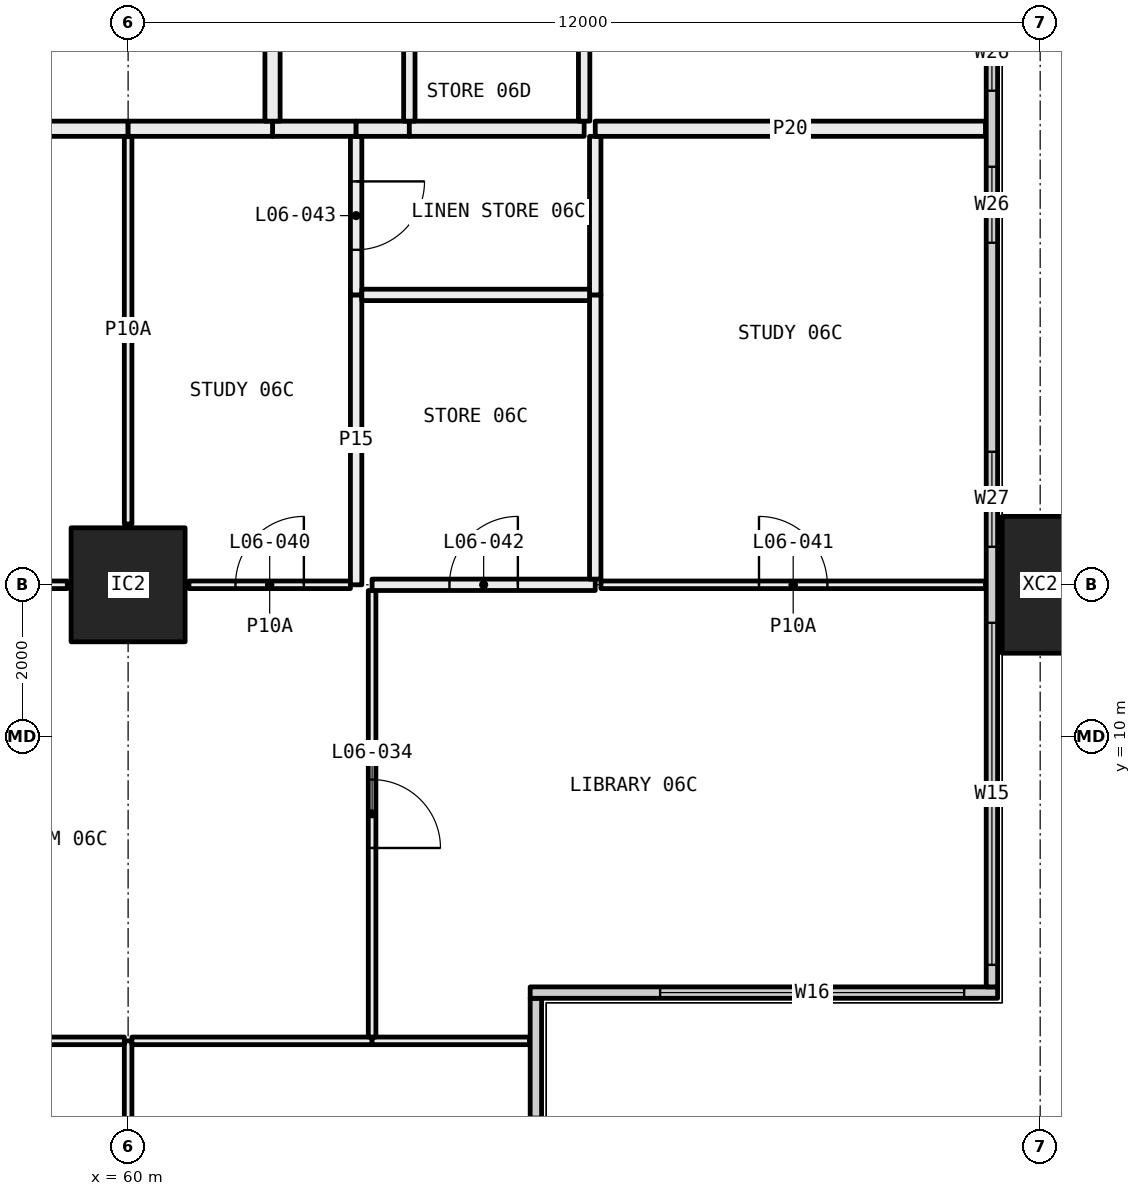
"""IFC4 building model, lengths in metres.
Left out: names, types, materials, properties, quantities, classifications, styles, units other than length and angle.
Written with IfcOpenShell. Run it as: python <this file> out.ifc"""

import sys

from ifc_helpers import new_model, si_unit, direction, frame, frame_2d, origin, origin_2d, place, context, subcontext, project, spatial, rectangle, hollow_rectangle, extrude, element, fill, save


model = new_model("IFC4")
c1 = context("Model", 3, precision=1e-05, world=origin(), true_north=direction((0.0, 1.0)))
c2 = subcontext(c1, "Body", "Model", "MODEL_VIEW")
j1 = project(units=[si_unit("LENGTHUNIT", "METRE"), si_unit("PLANEANGLEUNIT", "RADIAN")], contexts=[c1])
p1 = place(None, origin())
s1 = spatial("IfcSite", under=j1, at=p1, CompositionType="ELEMENT")
p2 = place(p1, origin())
s2 = spatial("IfcBuilding", under=s1, at=p2, CompositionType="ELEMENT")
p3 = place(p2, frame((0.0, 0.0, 33.45)))
s3 = spatial("IfcBuildingStorey", under=s2, at=p3, CompositionType="ELEMENT", Elevation=33.45)
p4 = place(p3, frame((60.0, 12.0, 0.0), z_axis=(0.0, 0.0, 1.0), x_axis=(1.0, 0.0, 0.0)))
e1 = element("IfcColumn", 1, at=p4, inside=s3, PredefinedType="COLUMN", context=c2, shape_type="SweptSolid", body=[
    extrude(hollow_rectangle(XDim=1.5, YDim=1.5, WallThickness=0.065, at=origin_2d()), origin(), (0.0, 0.0, 1.0), 3.05),
])
p5 = place(p3, frame((72.0, 12.0, -0.4), z_axis=(0.0, 0.0, 1.0), x_axis=(0.0, 1.0, 0.0)))
e2 = element("IfcColumn", 2, at=p5, inside=s3, PredefinedType="COLUMN", context=c2, shape_type="SweptSolid", body=[
    extrude(hollow_rectangle(XDim=1.8, YDim=1.0, WallThickness=0.07, at=origin_2d()), origin(), (0.0, 0.0, 1.0), 3.45),
])
p6 = place(p3, frame((65.365, 0.71, 0.0), z_axis=(0.0, 0.0, 1.0), x_axis=(0.0, 1.0, 0.0)))
e3 = element("IfcWall", 3, at=p6, inside=s3, PredefinedType="ELEMENTEDWALL", context=c2, shape_type="SweptSolid", body=[
    extrude(rectangle(XDim=5.85, YDim=0.15, at=frame_2d((2.925, 0.0))), origin(), (0.0, 0.0, 1.0), 3.05),
])
p7 = place(p6, frame((0.29, 0.0, 0.45)))
e4 = element("IfcOpeningElement", 4, at=p7, cuts=e3, PredefinedType="OPENING", context=c2, shape_type="SweptSolid", body=[
    extrude(rectangle(XDim=4.0, YDim=2.55, at=frame_2d((2.0, 1.275))), frame((0.0, 0.085, 0.0), z_axis=(0.0, -1.0, 0.0), x_axis=(1.0, 0.0, 0.0)), (0.0, 0.0, 1.0), 0.17),
])
p8 = place(p3, frame((65.29, 6.635, 0.0), z_axis=(0.0, 0.0, 1.0), x_axis=(1.0, 0.0, 0.0)))
e5 = element("IfcWall", 5, at=p8, inside=s3, PredefinedType="ELEMENTEDWALL", context=c2, shape_type="SweptSolid", body=[
    extrude(rectangle(XDim=6.15, YDim=0.15, at=frame_2d((3.075, 0.0))), origin(), (0.0, 0.0, 1.0), 3.05),
])
p9 = place(p8, frame((1.71, 0.0, 0.45)))
e6 = element("IfcOpeningElement", 6, at=p9, cuts=e5, PredefinedType="OPENING", context=c2, shape_type="SweptSolid", body=[
    extrude(rectangle(XDim=4.0, YDim=2.55, at=frame_2d((2.0, 1.275))), frame((0.0, 0.085, 0.0), z_axis=(0.0, -1.0, 0.0), x_axis=(1.0, 0.0, 0.0)), (0.0, 0.0, 1.0), 0.17),
])
p10 = place(p3, frame((71.365, 6.71, 0.0), z_axis=(0.0, 0.0, 1.0), x_axis=(0.0, 1.0, 0.0)))
e7 = element("IfcWall", 7, at=p10, inside=s3, PredefinedType="ELEMENTEDWALL", context=c2, shape_type="SweptSolid", body=[
    extrude(rectangle(XDim=34.58, YDim=0.15, at=frame_2d((17.29, 0.0))), origin(), (0.0, 0.0, 1.0), 3.05),
])
p11 = place(p10, frame((0.29, 0.0, 0.45)))
e8 = element("IfcOpeningElement", 8, at=p11, cuts=e7, PredefinedType="OPENING", context=c2, shape_type="SweptSolid", body=[
    extrude(rectangle(XDim=4.5, YDim=2.55, at=frame_2d((2.25, 1.275))), frame((0.0, 0.085, 0.0), z_axis=(0.0, -1.0, 0.0), x_axis=(1.0, 0.0, 0.0)), (0.0, 0.0, 1.0), 0.17),
])
p12 = place(p10, frame((5.79, 0.0, 0.45)))
e9 = element("IfcOpeningElement", 9, at=p12, cuts=e7, PredefinedType="OPENING", context=c2, shape_type="SweptSolid", body=[
    extrude(rectangle(XDim=1.25, YDim=2.55, at=frame_2d((0.625, 1.275))), frame((0.0, 0.085, 0.0), z_axis=(0.0, -1.0, 0.0), x_axis=(1.0, 0.0, 0.0)), (0.0, 0.0, 1.0), 0.17),
])
p13 = place(p10, frame((9.79, 0.0, 0.45)))
e10 = element("IfcOpeningElement", 10, at=p13, cuts=e7, PredefinedType="OPENING", context=c2, shape_type="SweptSolid", body=[
    extrude(rectangle(XDim=1.0, YDim=2.55, at=frame_2d((0.5, 1.275))), frame((0.0, 0.085, 0.0), z_axis=(0.0, -1.0, 0.0), x_axis=(1.0, 0.0, 0.0)), (0.0, 0.0, 1.0), 0.17),
])
p14 = place(p10, frame((11.79, 0.0, 0.45)))
e11 = element("IfcOpeningElement", 11, at=p14, cuts=e7, PredefinedType="OPENING", context=c2, shape_type="SweptSolid", body=[
    extrude(rectangle(XDim=1.0, YDim=2.55, at=frame_2d((0.5, 1.275))), frame((0.0, 0.085, 0.0), z_axis=(0.0, -1.0, 0.0), x_axis=(1.0, 0.0, 0.0)), (0.0, 0.0, 1.0), 0.17),
])
p15 = place(p10, frame((15.54, 0.0, 0.45)))
e12 = element("IfcOpeningElement", 12, at=p15, cuts=e7, PredefinedType="OPENING", context=c2, shape_type="SweptSolid", body=[
    extrude(rectangle(XDim=1.25, YDim=2.55, at=frame_2d((0.625, 1.275))), frame((0.0, 0.085, 0.0), z_axis=(0.0, -1.0, 0.0), x_axis=(1.0, 0.0, 0.0)), (0.0, 0.0, 1.0), 0.17),
])
p16 = place(p10, frame((17.79, 0.0, 0.45)))
e13 = element("IfcOpeningElement", 13, at=p16, cuts=e7, PredefinedType="OPENING", context=c2, shape_type="SweptSolid", body=[
    extrude(rectangle(XDim=1.25, YDim=2.55, at=frame_2d((0.625, 1.275))), frame((0.0, 0.085, 0.0), z_axis=(0.0, -1.0, 0.0), x_axis=(1.0, 0.0, 0.0)), (0.0, 0.0, 1.0), 0.17),
])
p17 = place(p10, frame((21.79, 0.0, 0.45)))
e14 = element("IfcOpeningElement", 14, at=p17, cuts=e7, PredefinedType="OPENING", context=c2, shape_type="SweptSolid", body=[
    extrude(rectangle(XDim=1.0, YDim=2.55, at=frame_2d((0.5, 1.275))), frame((0.0, 0.085, 0.0), z_axis=(0.0, -1.0, 0.0), x_axis=(1.0, 0.0, 0.0)), (0.0, 0.0, 1.0), 0.17),
])
p18 = place(p10, frame((23.79, 0.0, 0.45)))
e15 = element("IfcOpeningElement", 15, at=p18, cuts=e7, PredefinedType="OPENING", context=c2, shape_type="SweptSolid", body=[
    extrude(rectangle(XDim=1.0, YDim=2.55, at=frame_2d((0.5, 1.275))), frame((0.0, 0.085, 0.0), z_axis=(0.0, -1.0, 0.0), x_axis=(1.0, 0.0, 0.0)), (0.0, 0.0, 1.0), 0.17),
])
p19 = place(p10, frame((27.54, 0.0, 0.45)))
e16 = element("IfcOpeningElement", 16, at=p19, cuts=e7, PredefinedType="OPENING", context=c2, shape_type="SweptSolid", body=[
    extrude(rectangle(XDim=1.25, YDim=2.55, at=frame_2d((0.625, 1.275))), frame((0.0, 0.085, 0.0), z_axis=(0.0, -1.0, 0.0), x_axis=(1.0, 0.0, 0.0)), (0.0, 0.0, 1.0), 0.17),
])
p20 = place(p10, frame((29.79, 0.0, 0.45)))
e17 = element("IfcOpeningElement", 17, at=p20, cuts=e7, PredefinedType="OPENING", context=c2, shape_type="SweptSolid", body=[
    extrude(rectangle(XDim=4.5, YDim=2.55, at=frame_2d((2.25, 1.275))), frame((0.0, 0.085, 0.0), z_axis=(0.0, -1.0, 0.0), x_axis=(1.0, 0.0, 0.0)), (0.0, 0.0, 1.0), 0.17),
])
p21 = place(p3, frame((60.0, 0.72, 0.0), z_axis=(0.0, 0.0, 1.0), x_axis=(0.0, 1.0, 0.0)))
e18 = element("IfcWall", 18, at=p21, inside=s3, PredefinedType="PARTITIONING", context=c2, shape_type="SweptSolid", body=[
    extrude(rectangle(XDim=5.28, YDim=0.1, at=frame_2d((2.64, 0.0))), origin(), (0.0, 0.0, 1.0), 2.45),
])
p22 = place(p21, frame((2.19, 0.0, 0.0)))
e19 = element("IfcOpeningElement", 19, at=p22, cuts=e18, PredefinedType="OPENING", context=c2, shape_type="SweptSolid", body=[
    extrude(rectangle(XDim=0.9, YDim=2.1, at=frame_2d((0.45, 1.05))), frame((0.0, 0.06, 0.0), z_axis=(0.0, -1.0, 0.0), x_axis=(1.0, 0.0, 0.0)), (0.0, 0.0, 1.0), 0.12),
])
p23 = place(p3, frame((59.95, 6.0, 0.0), z_axis=(0.0, 0.0, 1.0), x_axis=(-1.0, 0.0, 0.0)))
e20 = element("IfcWall", 20, at=p23, inside=s3, PredefinedType="PARTITIONING", context=c2, shape_type="SweptSolid", body=[
    extrude(rectangle(XDim=4.81, YDim=0.1, at=frame_2d((2.405, 0.0))), origin(), (0.0, 0.0, 1.0), 2.45),
])
p24 = place(p3, frame((63.21, 6.0, 0.0), z_axis=(0.0, 0.0, 1.0), x_axis=(-1.0, 0.0, 0.0)))
e21 = element("IfcWall", 21, at=p24, inside=s3, PredefinedType="PARTITIONING", context=c2, shape_type="SweptSolid", body=[
    extrude(rectangle(XDim=3.16, YDim=0.1, at=frame_2d((1.58, 0.0))), origin(), (0.0, 0.0, 1.0), 2.45),
])
p25 = place(p3, frame((65.28, 6.0, 0.0), z_axis=(0.0, 0.0, 1.0), x_axis=(-1.0, 0.0, 0.0)))
e22 = element("IfcWall", 22, at=p25, inside=s3, PredefinedType="PARTITIONING", context=c2, shape_type="SweptSolid", body=[
    extrude(rectangle(XDim=2.07, YDim=0.1, at=frame_2d((1.035, 0.0))), origin(), (0.0, 0.0, 1.0), 3.05),
])
p26 = place(p3, frame((63.21, 6.05, 0.0), z_axis=(0.0, 0.0, 1.0), x_axis=(0.0, 1.0, 0.0)))
e23 = element("IfcWall", 23, at=p26, inside=s3, PredefinedType="PARTITIONING", context=c2, shape_type="SweptSolid", body=[
    extrude(rectangle(XDim=5.875, YDim=0.1, at=frame_2d((2.938, 0.0))), origin(), (0.0, 0.0, 1.0), 2.45),
])
p27 = place(p26, frame((2.488, 0.0, 0.0)))
e24 = element("IfcOpeningElement", 24, at=p27, cuts=e23, PredefinedType="OPENING", context=c2, shape_type="SweptSolid", body=[
    extrude(rectangle(XDim=0.9, YDim=2.1, at=frame_2d((0.45, 1.05))), frame((0.0, 0.06, 0.0), z_axis=(0.0, -1.0, 0.0), x_axis=(1.0, 0.0, 0.0)), (0.0, 0.0, 1.0), 0.12),
])
p28 = place(p3, frame((59.2, 12.0, 0.0), z_axis=(0.0, 0.0, 1.0), x_axis=(-1.0, 0.0, 0.0)))
e25 = element("IfcWall", 25, at=p28, inside=s3, PredefinedType="PARTITIONING", context=c2, shape_type="SweptSolid", body=[
    extrude(rectangle(XDim=3.7, YDim=0.1, at=frame_2d((1.85, 0.0))), origin(), (0.0, 0.0, 1.0), 2.45),
])
p29 = place(p3, frame((62.925, 12.0, 0.0), z_axis=(0.0, 0.0, 1.0), x_axis=(-1.0, 0.0, 0.0)))
e26 = element("IfcWall", 26, at=p29, inside=s3, PredefinedType="PARTITIONING", context=c2, shape_type="SweptSolid", body=[
    extrude(rectangle(XDim=2.125, YDim=0.1, at=frame_2d((1.062, 0.0))), origin(), (0.0, 0.0, 1.0), 2.45),
])
p30 = place(p29, frame((0.613, 0.0, 0.0)))
e27 = element("IfcOpeningElement", 27, at=p30, cuts=e26, PredefinedType="OPENING", context=c2, shape_type="SweptSolid", body=[
    extrude(rectangle(XDim=0.9, YDim=2.1, at=frame_2d((0.45, 1.05))), frame((0.0, 0.06, 0.0), z_axis=(0.0, -1.0, 0.0), x_axis=(1.0, 0.0, 0.0)), (0.0, 0.0, 1.0), 0.12),
])
p31 = place(p3, frame((71.28, 12.0, 0.0), z_axis=(0.0, 0.0, 1.0), x_axis=(-1.0, 0.0, 0.0)))
e28 = element("IfcWall", 28, at=p31, inside=s3, PredefinedType="PARTITIONING", context=c2, shape_type="SweptSolid", body=[
    extrude(rectangle(XDim=5.059, YDim=0.1, at=frame_2d((2.53, 0.0))), origin(), (0.0, 0.0, 1.0), 2.45),
])
p32 = place(p31, frame((2.08, 0.0, 0.0)))
e29 = element("IfcOpeningElement", 29, at=p32, cuts=e28, PredefinedType="OPENING", context=c2, shape_type="SweptSolid", body=[
    extrude(rectangle(XDim=0.9, YDim=2.1, at=frame_2d((0.45, 1.05))), frame((0.0, 0.06, 0.0), z_axis=(0.0, -1.0, 0.0), x_axis=(1.0, 0.0, 0.0)), (0.0, 0.0, 1.0), 0.12),
])
p33 = place(p3, frame((66.146, 12.0, 0.0), z_axis=(0.0, 0.0, 1.0), x_axis=(-1.0, 0.0, 0.0)))
e30 = element("IfcWall", 30, at=p33, inside=s3, PredefinedType="PARTITIONING", context=c2, shape_type="SweptSolid", body=[
    extrude(rectangle(XDim=2.936, YDim=0.15, at=frame_2d((1.468, 0.0))), origin(), (0.0, 0.0, 1.0), 2.45),
])
p34 = place(p33, frame((1.018, 0.0, 0.0)))
e31 = element("IfcOpeningElement", 31, at=p34, cuts=e30, PredefinedType="OPENING", context=c2, shape_type="SweptSolid", body=[
    extrude(rectangle(XDim=0.9, YDim=2.1, at=frame_2d((0.45, 1.05))), frame((0.0, 0.085, 0.0), z_axis=(0.0, -1.0, 0.0), x_axis=(1.0, 0.0, 0.0)), (0.0, 0.0, 1.0), 0.17),
])
p35 = place(p3, frame((60.0, 12.8, 0.0), z_axis=(0.0, 0.0, 1.0), x_axis=(0.0, 1.0, 0.0)))
e32 = element("IfcWall", 32, at=p35, inside=s3, PredefinedType="PARTITIONING", context=c2, shape_type="SweptSolid", body=[
    extrude(rectangle(XDim=5.1, YDim=0.1, at=frame_2d((2.55, 0.0))), origin(), (0.0, 0.0, 1.0), 3.05),
])
p36 = place(p3, frame((60.0, 18.0, 0.0), z_axis=(0.0, 0.0, 1.0), x_axis=(-1.0, 0.0, 0.0)))
e33 = element("IfcWall", 33, at=p36, inside=s3, PredefinedType="PARTITIONING", context=c2, shape_type="SweptSolid", body=[
    extrude(rectangle(XDim=4.5, YDim=0.2, at=frame_2d((2.25, 0.0))), origin(), (0.0, 0.0, 1.0), 3.05),
])
p37 = place(p3, frame((63.0, 12.0, 0.0), z_axis=(0.0, 0.0, 1.0), x_axis=(0.0, 1.0, 0.0)))
e34 = element("IfcWall", 34, at=p37, inside=s3, PredefinedType="PARTITIONING", context=c2, shape_type="SweptSolid", body=[
    extrude(rectangle(XDim=3.814, YDim=0.15, at=frame_2d((1.907, 0.0))), origin(), (0.0, 0.0, 1.0), 2.45),
])
p38 = place(p3, frame((63.0, 15.814, 0.0), z_axis=(0.0, 0.0, 1.0), x_axis=(0.0, 1.0, 0.0)))
e35 = element("IfcWall", 35, at=p38, inside=s3, PredefinedType="PARTITIONING", context=c2, shape_type="SweptSolid", body=[
    extrude(rectangle(XDim=2.086, YDim=0.15, at=frame_2d((1.043, 0.0))), origin(), (0.0, 0.0, 1.0), 3.05),
])
p39 = place(p38, frame((0.593, 0.0, 0.0)))
e36 = element("IfcOpeningElement", 36, at=p39, cuts=e35, PredefinedType="OPENING", context=c2, shape_type="SweptSolid", body=[
    extrude(rectangle(XDim=0.9, YDim=2.1, at=frame_2d((0.45, 1.05))), frame((0.0, 0.085, 0.0), z_axis=(0.0, -1.0, 0.0), x_axis=(1.0, 0.0, 0.0)), (0.0, 0.0, 1.0), 0.17),
])
p40 = place(p3, frame((63.0, 18.0, 0.0), z_axis=(0.0, 0.0, 1.0), x_axis=(-1.0, 0.0, 0.0)))
e37 = element("IfcWall", 37, at=p40, inside=s3, PredefinedType="PARTITIONING", context=c2, shape_type="SweptSolid", body=[
    extrude(rectangle(XDim=1.1, YDim=0.2, at=frame_2d((0.55, 0.0))), origin(), (0.0, 0.0, 1.0), 3.05),
])
p41 = place(p3, frame((61.9, 18.0, 0.0), z_axis=(0.0, 0.0, 1.0), x_axis=(-1.0, 0.0, 0.0)))
e38 = element("IfcWall", 38, at=p41, inside=s3, PredefinedType="PARTITIONING", context=c2, shape_type="SweptSolid", body=[
    extrude(rectangle(XDim=1.9, YDim=0.2, at=frame_2d((0.95, 0.0))), origin(), (0.0, 0.0, 1.0), 3.05),
])
p42 = place(p3, frame((66.146, 15.814, 0.0), z_axis=(0.0, 0.0, 1.0), x_axis=(0.0, -1.0, 0.0)))
e39 = element("IfcWall", 39, at=p42, inside=s3, PredefinedType="PARTITIONING", context=c2, shape_type="SweptSolid", body=[
    extrude(rectangle(XDim=3.739, YDim=0.15, at=frame_2d((1.87, 0.0))), origin(), (0.0, 0.0, 1.0), 2.45),
])
p43 = place(p3, frame((66.146, 17.9, 0.0), z_axis=(0.0, 0.0, 1.0), x_axis=(0.0, -1.0, 0.0)))
e40 = element("IfcWall", 40, at=p43, inside=s3, PredefinedType="PARTITIONING", context=c2, shape_type="SweptSolid", body=[
    extrude(rectangle(XDim=2.086, YDim=0.15, at=frame_2d((1.043, 0.0))), origin(), (0.0, 0.0, 1.0), 2.55),
])
p44 = place(p3, frame((71.28, 18.0, 0.0), z_axis=(0.0, 0.0, 1.0), x_axis=(-1.0, 0.0, 0.0)))
e41 = element("IfcWall", 41, at=p44, inside=s3, PredefinedType="PARTITIONING", context=c2, shape_type="SweptSolid", body=[
    extrude(rectangle(XDim=5.134, YDim=0.2, at=frame_2d((2.567, 0.0))), origin(), (0.0, 0.0, 1.0), 3.05),
])
p45 = place(p3, frame((66.071, 15.814, 0.0), z_axis=(0.0, 0.0, 1.0), x_axis=(-1.0, 0.0, 0.0)))
e42 = element("IfcWall", 42, at=p45, inside=s3, PredefinedType="PARTITIONING", context=c2, shape_type="SweptSolid", body=[
    extrude(rectangle(XDim=2.996, YDim=0.15, at=frame_2d((1.498, 0.0))), origin(), (0.0, 0.0, 1.0), 3.05),
])
p46 = place(p3, frame((63.7, 18.0, 0.0), z_axis=(0.0, 0.0, 1.0), x_axis=(-1.0, 0.0, 0.0)))
e43 = element("IfcWall", 43, at=p46, inside=s3, PredefinedType="PARTITIONING", context=c2, shape_type="SweptSolid", body=[
    extrude(rectangle(XDim=0.7, YDim=0.2, at=frame_2d((0.35, 0.0))), origin(), (0.0, 0.0, 1.0), 3.05),
])
p47 = place(p3, frame((66.0, 18.0, 0.0), z_axis=(0.0, 0.0, 1.0), x_axis=(-1.0, 0.0, 0.0)))
e44 = element("IfcWall", 44, at=p47, inside=s3, PredefinedType="PARTITIONING", context=c2, shape_type="SweptSolid", body=[
    extrude(rectangle(XDim=2.3, YDim=0.2, at=frame_2d((1.15, 0.0))), origin(), (0.0, 0.0, 1.0), 3.05),
])
p48 = place(p3, frame((66.0, 21.0, 0.0), z_axis=(0.0, 0.0, 1.0), x_axis=(0.0, -1.0, 0.0)))
e45 = element("IfcWall", 45, at=p48, inside=s3, PredefinedType="PARTITIONING", context=c2, shape_type="SweptSolid", body=[
    extrude(rectangle(XDim=2.9, YDim=0.15, at=frame_2d((1.45, 0.0))), origin(), (0.0, 0.0, 1.0), 3.05),
])
p49 = place(p48, frame((1.0, 0.0, 0.0)))
e46 = element("IfcOpeningElement", 46, at=p49, cuts=e45, PredefinedType="OPENING", context=c2, shape_type="SweptSolid", body=[
    extrude(rectangle(XDim=0.9, YDim=2.1, at=frame_2d((0.45, 1.05))), frame((0.0, 0.085, 0.0), z_axis=(0.0, -1.0, 0.0), x_axis=(1.0, 0.0, 0.0)), (0.0, 0.0, 1.0), 0.17),
])
p50 = place(p3, frame((63.7, 18.1, 0.0), z_axis=(0.0, 0.0, 1.0), x_axis=(0.0, 1.0, 0.0)))
e47 = element("IfcWall", 47, at=p50, inside=s3, PredefinedType="PARTITIONING", context=c2, shape_type="SweptSolid", body=[
    extrude(rectangle(XDim=2.9, YDim=0.15, at=frame_2d((1.45, 0.0))), origin(), (0.0, 0.0, 1.0), 3.05),
])
p51 = place(p3, frame((61.9, 21.0, 0.0), z_axis=(0.0, 0.0, 1.0), x_axis=(0.0, -1.0, 0.0)))
e48 = element("IfcWall", 48, at=p51, inside=s3, PredefinedType="PARTITIONING", context=c2, shape_type="SweptSolid", body=[
    extrude(rectangle(XDim=2.9, YDim=0.2, at=frame_2d((1.45, 0.0))), origin(), (0.0, 0.0, 1.0), 3.05),
])
p52 = place(p9, origin())
e49 = element("IfcWindow", 49, at=p52, inside=s3, PartitioningType="SINGLE_PANEL", PredefinedType="WINDOW", context=c2, shape_type="SweptSolid", body=[
    extrude(rectangle(XDim=4.0, YDim=2.55, at=frame_2d((2.0, 1.275))), frame((0.0, 0.03, 0.0), z_axis=(0.0, -1.0, 0.0), x_axis=(1.0, 0.0, 0.0)), (0.0, 0.0, 1.0), 0.06),
])
fill(e6, e49)
p53 = place(p11, origin())
e50 = element("IfcWindow", 50, at=p53, inside=s3, PartitioningType="SINGLE_PANEL", PredefinedType="WINDOW", context=c2, shape_type="SweptSolid", body=[
    extrude(rectangle(XDim=4.5, YDim=2.55, at=frame_2d((2.25, 1.275))), frame((0.0, 0.03, 0.0), z_axis=(0.0, -1.0, 0.0), x_axis=(1.0, 0.0, 0.0)), (0.0, 0.0, 1.0), 0.06),
])
fill(e8, e50)
p54 = place(p12, origin())
e51 = element("IfcWindow", 51, at=p54, inside=s3, PartitioningType="SINGLE_PANEL", PredefinedType="WINDOW", context=c2, shape_type="SweptSolid", body=[
    extrude(rectangle(XDim=1.25, YDim=2.55, at=frame_2d((0.625, 1.275))), frame((0.0, 0.03, 0.0), z_axis=(0.0, -1.0, 0.0), x_axis=(1.0, 0.0, 0.0)), (0.0, 0.0, 1.0), 0.06),
])
fill(e9, e51)
p55 = place(p13, origin())
e52 = element("IfcWindow", 52, at=p55, inside=s3, PartitioningType="SINGLE_PANEL", PredefinedType="WINDOW", context=c2, shape_type="SweptSolid", body=[
    extrude(rectangle(XDim=1.0, YDim=2.55, at=frame_2d((0.5, 1.275))), frame((0.0, 0.03, 0.0), z_axis=(0.0, -1.0, 0.0), x_axis=(1.0, 0.0, 0.0)), (0.0, 0.0, 1.0), 0.06),
])
fill(e10, e52)
p56 = place(p14, origin())
e53 = element("IfcWindow", 53, at=p56, inside=s3, PartitioningType="SINGLE_PANEL", PredefinedType="WINDOW", context=c2, shape_type="SweptSolid", body=[
    extrude(rectangle(XDim=1.0, YDim=2.55, at=frame_2d((0.5, 1.275))), frame((0.0, 0.03, 0.0), z_axis=(0.0, -1.0, 0.0), x_axis=(1.0, 0.0, 0.0)), (0.0, 0.0, 1.0), 0.06),
])
fill(e11, e53)
p57 = place(p27, frame((0.9, 0.0, 0.0), x_axis=(-1.0, 0.0, 0.0)))
e54 = element("IfcDoor", 54, at=p57, inside=s3, OperationType="SINGLE_SWING_LEFT", PredefinedType="DOOR", context=c2, shape_type="SweptSolid", body=[
    extrude(rectangle(XDim=0.9, YDim=2.1, at=frame_2d((0.45, 1.05))), frame((0.0, 0.025, 0.0), z_axis=(0.0, -1.0, 0.0), x_axis=(1.0, 0.0, 0.0)), (0.0, 0.0, 1.0), 0.05),
])
fill(e24, e54)
p58 = place(p30, frame((0.9, 0.0, 0.0), x_axis=(-1.0, 0.0, 0.0)))
e55 = element("IfcDoor", 55, at=p58, inside=s3, OperationType="SINGLE_SWING_LEFT", PredefinedType="DOOR", context=c2, shape_type="SweptSolid", body=[
    extrude(rectangle(XDim=0.9, YDim=2.1, at=frame_2d((0.45, 1.05))), frame((0.0, 0.025, 0.0), z_axis=(0.0, -1.0, 0.0), x_axis=(1.0, 0.0, 0.0)), (0.0, 0.0, 1.0), 0.05),
])
fill(e27, e55)
p59 = place(p32, frame((0.9, 0.0, 0.0), x_axis=(-1.0, 0.0, 0.0)))
e56 = element("IfcDoor", 56, at=p59, inside=s3, OperationType="SINGLE_SWING_RIGHT", PredefinedType="DOOR", context=c2, shape_type="SweptSolid", body=[
    extrude(rectangle(XDim=0.9, YDim=2.1, at=frame_2d((0.45, 1.05))), frame((0.0, 0.025, 0.0), z_axis=(0.0, -1.0, 0.0), x_axis=(1.0, 0.0, 0.0)), (0.0, 0.0, 1.0), 0.05),
])
fill(e29, e56)
p60 = place(p34, frame((0.9, 0.0, 0.0), x_axis=(-1.0, 0.0, 0.0)))
e57 = element("IfcDoor", 57, at=p60, inside=s3, OperationType="SINGLE_SWING_LEFT", PredefinedType="DOOR", context=c2, shape_type="SweptSolid", body=[
    extrude(rectangle(XDim=0.9, YDim=2.1, at=frame_2d((0.45, 1.05))), frame((0.0, 0.025, 0.0), z_axis=(0.0, -1.0, 0.0), x_axis=(1.0, 0.0, 0.0)), (0.0, 0.0, 1.0), 0.05),
])
fill(e31, e57)
p61 = place(p39, frame((0.9, 0.0, 0.0), x_axis=(-1.0, 0.0, 0.0)))
e58 = element("IfcDoor", 58, at=p61, inside=s3, OperationType="SINGLE_SWING_RIGHT", PredefinedType="DOOR", context=c2, shape_type="SweptSolid", body=[
    extrude(rectangle(XDim=0.9, YDim=2.1, at=frame_2d((0.45, 1.05))), frame((0.0, 0.025, 0.0), z_axis=(0.0, -1.0, 0.0), x_axis=(1.0, 0.0, 0.0)), (0.0, 0.0, 1.0), 0.05),
])
fill(e36, e58)
save(model, sys.argv[1])
